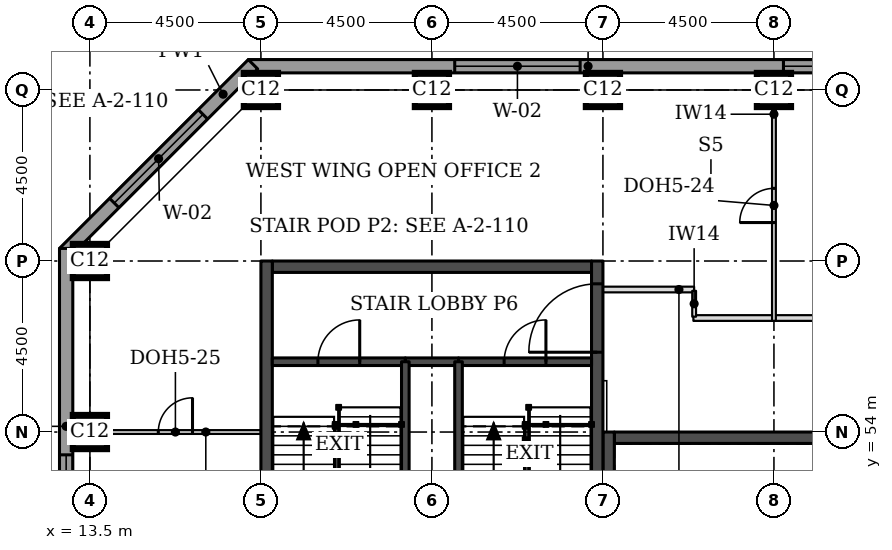
"""IFC4 building model, lengths in metres.
Left out: names, types, materials, properties, quantities, classifications, styles, units other than length and angle.
Written with IfcOpenShell. Run it as: python <this file> out.ifc"""

import sys

from ifc_helpers import new_model, si_unit, direction, frame, frame_2d, origin, origin_2d, place, context, subcontext, project, spatial, rectangle, extrude, element, fill, save


model = new_model("IFC4")
c1 = context("Model", 3, precision=1e-05, world=origin(), true_north=direction((0.0, 1.0)))
c2 = subcontext(c1, "Body", "Model", "MODEL_VIEW")
j1 = project(units=[si_unit("LENGTHUNIT", "METRE"), si_unit("PLANEANGLEUNIT", "RADIAN")], contexts=[c1])
p1 = place(None, origin())
s1 = spatial("IfcSite", under=j1, at=p1, CompositionType="ELEMENT")
p2 = place(p1, origin())
s2 = spatial("IfcBuilding", under=s1, at=p2, CompositionType="ELEMENT")
p3 = place(p2, frame((0.0, 0.0, 177.3)))
s3 = spatial("IfcBuildingStorey", under=s2, at=p3, CompositionType="ELEMENT", Elevation=177.3)
for number, where, z_axis, x_axis in (
    (1, (13.5, 54.0, 0.0), (0.0, 0.0, 1.0), (1.0, 0.0, 0.0)),
    (2, (13.5, 58.5, 0.0), (0.0, 0.0, 1.0), (1.0, 0.0, 0.0)),
    (3, (18.0, 63.0, 0.0), (0.0, 0.0, 1.0), (1.0, 0.0, 0.0)),
    (4, (22.5, 63.0, 0.0), (0.0, 0.0, 1.0), (1.0, 0.0, 0.0)),
    (5, (27.0, 63.0, 0.0), (0.0, 0.0, 1.0), (1.0, 0.0, 0.0)),
    (6, (31.5, 63.0, 0.0), (0.0, 0.0, 1.0), (1.0, 0.0, 0.0)),
):
    element("IfcColumn", number, at=place(p3, frame(where, z_axis=z_axis, x_axis=x_axis)), inside=s3, PredefinedType="COLUMN", context=c2, shape_type="SweptSolid", body=[
        extrude(rectangle(XDim=0.9, YDim=0.9, at=origin_2d()), origin(), (0.0, 0.0, 1.0), 3.7),
    ])
p4 = place(p3, frame((27.3, 53.85, 0.0), z_axis=(0.0, 0.0, 1.0), x_axis=(1.0, 0.0, 0.0)))
e7 = element("IfcWall", 7, at=p4, inside=s3, PredefinedType="SHEAR", context=c2, shape_type="SweptSolid", body=[
    extrude(rectangle(XDim=8.4, YDim=0.3, at=frame_2d((4.2, 0.0))), origin(), (0.0, 0.0, 1.0), 3.7),
])
p5 = place(p4, frame((6.4, 0.0, 0.0)))
e8 = element("IfcOpeningElement", 8, at=p5, cuts=e7, PredefinedType="OPENING", context=c2, shape_type="SweptSolid", body=[
    extrude(rectangle(XDim=1.1, YDim=2.1, at=frame_2d((0.55, 1.05))), frame((0.0, 0.16, 0.0), z_axis=(0.0, -1.0, 0.0), x_axis=(1.0, 0.0, 0.0)), (0.0, 0.0, 1.0), 0.32),
])
p6 = place(p3, frame((27.15, 45.0, 0.0), z_axis=(0.0, 0.0, 1.0), x_axis=(0.0, 1.0, 0.0)))
e9 = element("IfcWall", 9, at=p6, inside=s3, PredefinedType="SHEAR", context=c2, shape_type="SweptSolid", body=[
    extrude(rectangle(XDim=9.0, YDim=0.3, at=frame_2d((4.5, 0.0))), origin(), (0.0, 0.0, 1.0), 3.7),
])
p7 = place(p6, frame((0.4, 0.0, 0.0)))
e10 = element("IfcOpeningElement", 10, at=p7, cuts=e9, PredefinedType="OPENING", context=c2, shape_type="SweptSolid", body=[
    extrude(rectangle(XDim=1.1, YDim=2.1, at=frame_2d((0.55, 1.05))), frame((0.0, 0.16, 0.0), z_axis=(0.0, -1.0, 0.0), x_axis=(1.0, 0.0, 0.0)), (0.0, 0.0, 1.0), 0.32),
])
p8 = place(p3, frame((18.3, 58.35, 0.0), z_axis=(0.0, 0.0, 1.0), x_axis=(1.0, 0.0, 0.0)))
e11 = element("IfcWall", 11, at=p8, inside=s3, PredefinedType="SHEAR", context=c2, shape_type="SweptSolid", body=[
    extrude(rectangle(XDim=8.4, YDim=0.3, at=frame_2d((4.2, 0.0))), origin(), (0.0, 0.0, 1.0), 3.7),
])
p9 = place(p3, frame((18.15, 49.5, 0.0), z_axis=(0.0, 0.0, 1.0), x_axis=(0.0, 1.0, 0.0)))
e12 = element("IfcWall", 12, at=p9, inside=s3, PredefinedType="SHEAR", context=c2, shape_type="SweptSolid", body=[
    extrude(rectangle(XDim=9.0, YDim=0.3, at=frame_2d((4.5, 0.0))), origin(), (0.0, 0.0, 1.0), 3.7),
])
p10 = place(p3, frame((26.85, 49.5, 0.0), z_axis=(0.0, 0.0, 1.0), x_axis=(0.0, 1.0, 0.0)))
e13 = element("IfcWall", 13, at=p10, inside=s3, PredefinedType="SHEAR", context=c2, shape_type="SweptSolid", body=[
    extrude(rectangle(XDim=9.0, YDim=0.3, at=frame_2d((4.5, 0.0))), origin(), (0.0, 0.0, 1.0), 3.7),
])
p11 = place(p10, frame((6.6, 0.0, 0.0)))
e14 = element("IfcOpeningElement", 14, at=p11, cuts=e13, PredefinedType="OPENING", context=c2, shape_type="SweptSolid", body=[
    extrude(rectangle(XDim=1.8, YDim=2.1, at=frame_2d((0.9, 1.05))), frame((0.0, 0.16, 0.0), z_axis=(0.0, -1.0, 0.0), x_axis=(1.0, 0.0, 0.0)), (0.0, 0.0, 1.0), 0.32),
])
p12 = place(p3, frame((35.55, 63.625, 0.0), z_axis=(0.0, 0.0, 1.0), x_axis=(-1.0, 0.0, 0.0)))
e15 = element("IfcWall", 15, at=p12, inside=s3, PredefinedType="STANDARD", context=c2, shape_type="SweptSolid", body=[
    extrude(rectangle(XDim=17.881, YDim=0.35, at=frame_2d((8.941, 0.0))), origin(), (0.0, 0.0, 1.0), 3.525),
])
p13 = place(p12, frame((0.5, 0.0, 0.9)))
e16 = element("IfcOpeningElement", 16, at=p13, cuts=e15, PredefinedType="OPENING", context=c2, shape_type="SweptSolid", body=[
    extrude(rectangle(XDim=3.3, YDim=1.9, at=frame_2d((1.65, 0.95))), frame((0.0, 0.185, 0.0), z_axis=(0.0, -1.0, 0.0), x_axis=(1.0, 0.0, 0.0)), (0.0, 0.0, 1.0), 0.37),
])
p14 = place(p12, frame((9.15, 0.0, 0.9)))
e17 = element("IfcOpeningElement", 17, at=p14, cuts=e15, PredefinedType="OPENING", context=c2, shape_type="SweptSolid", body=[
    extrude(rectangle(XDim=3.3, YDim=1.9, at=frame_2d((1.65, 0.95))), frame((0.0, 0.185, 0.0), z_axis=(0.0, -1.0, 0.0), x_axis=(1.0, 0.0, 0.0)), (0.0, 0.0, 1.0), 0.37),
])
p15 = place(p3, frame((17.792, 63.676, 0.0), z_axis=(0.0, 0.0, 1.0), x_axis=(-0.707106781187, -0.707106781187, 0.0)))
e18 = element("IfcWall", 18, at=p15, inside=s3, PredefinedType="STANDARD", context=c2, shape_type="SweptSolid", body=[
    extrude(rectangle(XDim=7.027, YDim=0.35, at=frame_2d((3.513, 0.0))), origin(), (0.0, 0.0, 1.0), 3.525),
])
p16 = place(p15, frame((1.863, 0.0, 0.9)))
e19 = element("IfcOpeningElement", 19, at=p16, cuts=e18, PredefinedType="OPENING", context=c2, shape_type="SweptSolid", body=[
    extrude(rectangle(XDim=3.3, YDim=1.9, at=frame_2d((1.65, 0.95))), frame((0.0, 0.185, 0.0), z_axis=(0.0, -1.0, 0.0), x_axis=(1.0, 0.0, 0.0)), (0.0, 0.0, 1.0), 0.37),
])
p17 = place(p3, frame((12.875, 58.831, 0.0), z_axis=(0.0, 0.0, 1.0), x_axis=(0.0, -1.0, 0.0)))
e20 = element("IfcWall", 20, at=p17, inside=s3, PredefinedType="STANDARD", context=c2, shape_type="SweptSolid", body=[
    extrude(rectangle(XDim=14.163, YDim=0.35, at=frame_2d((7.081, 0.0))), origin(), (0.0, 0.0, 1.0), 3.525),
])
p18 = place(p17, frame((5.431, 0.0, 0.9)))
e21 = element("IfcOpeningElement", 21, at=p18, cuts=e20, PredefinedType="OPENING", context=c2, shape_type="SweptSolid", body=[
    extrude(rectangle(XDim=3.3, YDim=1.9, at=frame_2d((1.65, 0.95))), frame((0.0, 0.185, 0.0), z_axis=(0.0, -1.0, 0.0), x_axis=(1.0, 0.0, 0.0)), (0.0, 0.0, 1.0), 0.37),
])
p19 = place(p3, frame((29.38, 57.0, 0.0), z_axis=(0.0, 0.0, 1.0), x_axis=(1.0, 0.0, 0.0)))
e22 = element("IfcWall", 22, at=p19, inside=s3, PredefinedType="PARTITIONING", context=c2, shape_type="SweptSolid", body=[
    extrude(rectangle(XDim=12.695, YDim=0.15, at=frame_2d((6.348, 0.0))), origin(), (0.0, 0.0, 1.0), 3.55),
])
p20 = place(p3, frame((31.5, 63.0, 0.0), z_axis=(0.0, 0.0, 1.0), x_axis=(0.0, -1.0, 0.0)))
e23 = element("IfcWall", 23, at=p20, inside=s3, PredefinedType="PARTITIONING", context=c2, shape_type="SweptSolid", body=[
    extrude(rectangle(XDim=6.075, YDim=0.1, at=frame_2d((3.038, 0.0))), origin(), (0.0, 0.0, 1.0), 3.55),
])
p21 = place(p20, frame((2.588, 0.0, 0.0)))
e24 = element("IfcOpeningElement", 24, at=p21, cuts=e23, PredefinedType="OPENING", context=c2, shape_type="SweptSolid", body=[
    extrude(rectangle(XDim=0.9, YDim=2.1, at=frame_2d((0.45, 1.05))), frame((0.0, 0.06, 0.0), z_axis=(0.0, -1.0, 0.0), x_axis=(1.0, 0.0, 0.0)), (0.0, 0.0, 1.0), 0.12),
])
p22 = place(p3, frame((13.5, 54.0, 0.0), z_axis=(0.0, 0.0, 1.0), x_axis=(1.0, 0.0, 0.0)))
e25 = element("IfcWall", 25, at=p22, inside=s3, PredefinedType="PARTITIONING", context=c2, shape_type="SweptSolid", body=[
    extrude(rectangle(XDim=4.5, YDim=0.1, at=frame_2d((2.25, 0.0))), origin(), (0.0, 0.0, 1.0), 3.55),
])
p23 = place(p22, frame((1.8, 0.0, 0.0)))
e26 = element("IfcOpeningElement", 26, at=p23, cuts=e25, PredefinedType="OPENING", context=c2, shape_type="SweptSolid", body=[
    extrude(rectangle(XDim=0.9, YDim=2.1, at=frame_2d((0.45, 1.05))), frame((0.0, 0.06, 0.0), z_axis=(0.0, -1.0, 0.0), x_axis=(1.0, 0.0, 0.0)), (0.0, 0.0, 1.0), 0.12),
])
p24 = place(p3, frame((27.0, 57.75, 0.0), z_axis=(0.0, 0.0, 1.0), x_axis=(1.0, 0.0, 0.0)))
e27 = element("IfcWall", 27, at=p24, inside=s3, PredefinedType="PARTITIONING", context=c2, shape_type="SweptSolid", body=[
    extrude(rectangle(XDim=2.4, YDim=0.15, at=frame_2d((1.2, 0.0))), origin(), (0.0, 0.0, 1.0), 3.55),
])
p25 = place(p3, frame((29.4, 57.715, 0.0), z_axis=(0.0, 0.0, 1.0), x_axis=(0.0, -1.0, 0.0)))
e28 = element("IfcWall", 28, at=p25, inside=s3, PredefinedType="PARTITIONING", context=c2, shape_type="SweptSolid", body=[
    extrude(rectangle(XDim=0.68, YDim=0.1, at=frame_2d((0.34, 0.0))), origin(), (0.0, 0.0, 1.0), 3.55),
])
p26 = place(p3, frame((21.8, 55.85, 0.0), z_axis=(0.0, 0.0, 1.0), x_axis=(1.0, 0.0, 0.0)))
e29 = element("IfcWall", 29, at=p26, inside=s3, PredefinedType="SOLIDWALL", context=c2, shape_type="SweptSolid", body=[
    extrude(rectangle(XDim=1.4, YDim=0.2, at=frame_2d((0.7, 0.0))), origin(), (0.0, 0.0, 1.0), 3.55),
])
p27 = place(p3, frame((18.3, 55.85, 0.0), z_axis=(0.0, 0.0, 1.0), x_axis=(1.0, 0.0, 0.0)))
e30 = element("IfcWall", 30, at=p27, inside=s3, PredefinedType="SOLIDWALL", context=c2, shape_type="SweptSolid", body=[
    extrude(rectangle(XDim=3.5, YDim=0.2, at=frame_2d((1.75, 0.0))), origin(), (0.0, 0.0, 1.0), 3.55),
])
p28 = place(p27, frame((1.2, 0.0, 0.0)))
e31 = element("IfcOpeningElement", 31, at=p28, cuts=e30, PredefinedType="OPENING", context=c2, shape_type="SweptSolid", body=[
    extrude(rectangle(XDim=1.1, YDim=2.1, at=frame_2d((0.55, 1.05))), frame((0.0, 0.11, 0.0), z_axis=(0.0, -1.0, 0.0), x_axis=(1.0, 0.0, 0.0)), (0.0, 0.0, 1.0), 0.22),
])
p29 = place(p3, frame((23.2, 55.85, 0.0), z_axis=(0.0, 0.0, 1.0), x_axis=(1.0, 0.0, 0.0)))
e32 = element("IfcWall", 32, at=p29, inside=s3, PredefinedType="SOLIDWALL", context=c2, shape_type="SweptSolid", body=[
    extrude(rectangle(XDim=3.5, YDim=0.2, at=frame_2d((1.75, 0.0))), origin(), (0.0, 0.0, 1.0), 3.55),
])
p30 = place(p29, frame((1.2, 0.0, 0.0)))
e33 = element("IfcOpeningElement", 33, at=p30, cuts=e32, PredefinedType="OPENING", context=c2, shape_type="SweptSolid", body=[
    extrude(rectangle(XDim=1.1, YDim=2.1, at=frame_2d((0.55, 1.05))), frame((0.0, 0.11, 0.0), z_axis=(0.0, -1.0, 0.0), x_axis=(1.0, 0.0, 0.0)), (0.0, 0.0, 1.0), 0.22),
])
for number, where, z_axis, x_axis in (
    (34, (21.8, 49.8, 0.0), (0.0, 0.0, 1.0), (0.0, 1.0, 0.0)),
    (35, (23.2, 49.8, 0.0), (0.0, 0.0, 1.0), (0.0, 1.0, 0.0)),
):
    element("IfcWall", number, at=place(p3, frame(where, z_axis=z_axis, x_axis=x_axis)), inside=s3, PredefinedType="SOLIDWALL", context=c2, shape_type="SweptSolid", body=[
        extrude(rectangle(XDim=6.05, YDim=0.2, at=frame_2d((3.025, 0.0))), origin(), (0.0, 0.0, 1.0), 3.55),
    ])
p31 = place(p13, origin())
e36 = element("IfcWindow", 36, at=p31, inside=s3, PartitioningType="SINGLE_PANEL", PredefinedType="WINDOW", context=c2, shape_type="SweptSolid", body=[
    extrude(rectangle(XDim=3.3, YDim=1.9, at=frame_2d((1.65, 0.95))), frame((0.0, 0.085, 0.0), z_axis=(0.0, -1.0, 0.0), x_axis=(1.0, 0.0, 0.0)), (0.0, 0.0, 1.0), 0.06),
])
fill(e16, e36)
p32 = place(p14, origin())
e37 = element("IfcWindow", 37, at=p32, inside=s3, PartitioningType="SINGLE_PANEL", PredefinedType="WINDOW", context=c2, shape_type="SweptSolid", body=[
    extrude(rectangle(XDim=3.3, YDim=1.9, at=frame_2d((1.65, 0.95))), frame((0.0, 0.085, 0.0), z_axis=(0.0, -1.0, 0.0), x_axis=(1.0, 0.0, 0.0)), (0.0, 0.0, 1.0), 0.06),
])
fill(e17, e37)
p33 = place(p16, origin())
e38 = element("IfcWindow", 38, at=p33, inside=s3, PartitioningType="SINGLE_PANEL", PredefinedType="WINDOW", context=c2, shape_type="SweptSolid", body=[
    extrude(rectangle(XDim=3.3, YDim=1.9, at=frame_2d((1.65, 0.95))), frame((0.0, 0.085, 0.0), z_axis=(0.0, -1.0, 0.0), x_axis=(1.0, 0.0, 0.0)), (0.0, 0.0, 1.0), 0.06),
])
fill(e19, e38)
p34 = place(p18, origin())
e39 = element("IfcWindow", 39, at=p34, inside=s3, PartitioningType="SINGLE_PANEL", PredefinedType="WINDOW", context=c2, shape_type="SweptSolid", body=[
    extrude(rectangle(XDim=3.3, YDim=1.9, at=frame_2d((1.65, 0.95))), frame((0.0, 0.085, 0.0), z_axis=(0.0, -1.0, 0.0), x_axis=(1.0, 0.0, 0.0)), (0.0, 0.0, 1.0), 0.06),
])
fill(e21, e39)
p35 = place(p21, frame((0.9, 0.0, 0.0), z_axis=(0.0, 0.0, 1.0), x_axis=(-1.0, 0.0, 0.0)))
e40 = element("IfcDoor", 40, at=p35, inside=s3, OperationType="SINGLE_SWING_LEFT", PredefinedType="DOOR", context=c2, shape_type="SweptSolid", body=[
    extrude(rectangle(XDim=0.9, YDim=2.1, at=frame_2d((0.45, 1.05))), frame((0.0, 0.025, 0.0), z_axis=(0.0, -1.0, 0.0), x_axis=(1.0, 0.0, 0.0)), (0.0, 0.0, 1.0), 0.05),
])
fill(e24, e40)
p36 = place(p23, origin())
e41 = element("IfcDoor", 41, at=p36, inside=s3, OperationType="SINGLE_SWING_RIGHT", PredefinedType="DOOR", context=c2, shape_type="SweptSolid", body=[
    extrude(rectangle(XDim=0.9, YDim=2.1, at=frame_2d((0.45, 1.05))), frame((0.0, 0.025, 0.0), z_axis=(0.0, -1.0, 0.0), x_axis=(1.0, 0.0, 0.0)), (0.0, 0.0, 1.0), 0.05),
])
fill(e26, e41)
p37 = place(p28, origin())
e42 = element("IfcDoor", 42, at=p37, inside=s3, OperationType="SINGLE_SWING_RIGHT", PredefinedType="DOOR", context=c2, shape_type="SweptSolid", body=[
    extrude(rectangle(XDim=1.1, YDim=2.1, at=frame_2d((0.55, 1.05))), frame((0.0, 0.025, 0.0), z_axis=(0.0, -1.0, 0.0), x_axis=(1.0, 0.0, 0.0)), (0.0, 0.0, 1.0), 0.05),
])
fill(e31, e42)
p38 = place(p30, origin())
e43 = element("IfcDoor", 43, at=p38, inside=s3, OperationType="SINGLE_SWING_RIGHT", PredefinedType="DOOR", context=c2, shape_type="SweptSolid", body=[
    extrude(rectangle(XDim=1.1, YDim=2.1, at=frame_2d((0.55, 1.05))), frame((0.0, 0.025, 0.0), z_axis=(0.0, -1.0, 0.0), x_axis=(1.0, 0.0, 0.0)), (0.0, 0.0, 1.0), 0.05),
])
fill(e33, e43)
p39 = place(p11, origin())
e44 = element("IfcDoor", 44, at=p39, inside=s3, OperationType="SINGLE_SWING_LEFT", PredefinedType="DOOR", context=c2, shape_type="SweptSolid", body=[
    extrude(rectangle(XDim=1.8, YDim=2.1, at=frame_2d((0.9, 1.05))), frame((0.0, 0.025, 0.0), z_axis=(0.0, -1.0, 0.0), x_axis=(1.0, 0.0, 0.0)), (0.0, 0.0, 1.0), 0.05),
])
fill(e14, e44)
save(model, sys.argv[1])
